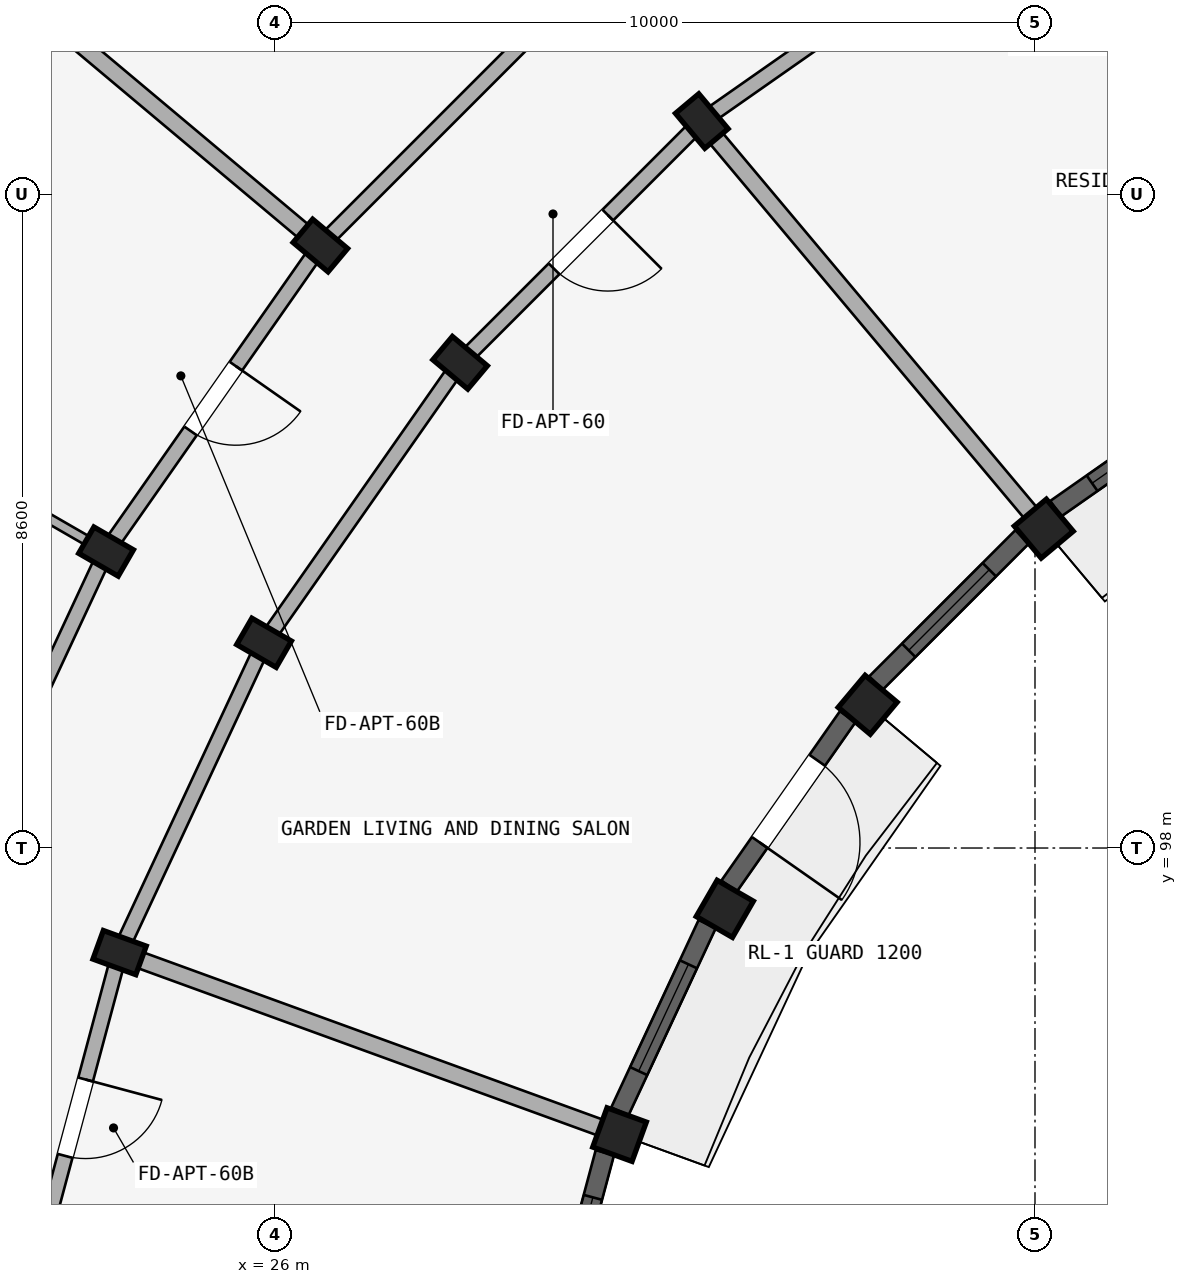
"""IFC4 building model, lengths in metres.
Left out: names, types, materials, properties, quantities, classifications, styles, units other than length and angle.
Written with IfcOpenShell. Run it as: python <this file> out.ifc"""

import sys

from ifc_helpers import new_model, si_unit, direction, frame, frame_2d, origin, origin_2d, place, context, subcontext, project, spatial, rectangle, extrude, element, fill, save


model = new_model("IFC4")
c1 = context("Model", 3, precision=1e-05, world=origin(), true_north=direction((0.0, 1.0)))
c2 = subcontext(c1, "Body", "Model", "MODEL_VIEW")
j1 = project(units=[si_unit("LENGTHUNIT", "METRE"), si_unit("PLANEANGLEUNIT", "RADIAN")], contexts=[c1])
p1 = place(None, origin())
s1 = spatial("IfcSite", under=j1, at=p1, CompositionType="ELEMENT")
p2 = place(p1, origin())
s2 = spatial("IfcBuilding", under=s1, at=p2, CompositionType="ELEMENT")
p3 = place(p2, frame((0.0, 0.0, 40.2)))
s3 = spatial("IfcBuildingStorey", under=s2, at=p3, CompositionType="ELEMENT", Elevation=40.2)
p4 = place(p3, frame((36.115, 102.202, 0.0), z_axis=(0.0, 0.0, 1.0), x_axis=(0.766044443119, 0.642787609687, 0.0)))
e1 = element("IfcColumn", 1, at=p4, inside=s3, PredefinedType="COLUMN", context=c2, shape_type="SweptSolid", body=[
    extrude(rectangle(XDim=0.55, YDim=0.55, at=origin_2d()), origin(), (0.0, 0.0, 1.0), 2.93),
])
p5 = place(p3, frame((31.616, 107.564, 0.0), z_axis=(0.0, 0.0, 1.0), x_axis=(0.766044443119, 0.642787609687, 0.0)))
e2 = element("IfcColumn", 2, at=p5, inside=s3, PredefinedType="COLUMN", context=c2, shape_type="SweptSolid", body=[
    extrude(rectangle(XDim=0.4, YDim=0.6, at=origin_2d()), origin(), (0.0, 0.0, 1.0), 2.93),
])
p6 = place(p3, frame((33.798, 99.885, 0.0), z_axis=(0.0, 0.0, 1.0), x_axis=(0.642787609687, 0.766044443119, 0.0)))
e3 = element("IfcColumn", 3, at=p6, inside=s3, PredefinedType="COLUMN", context=c2, shape_type="SweptSolid", body=[
    extrude(rectangle(XDim=0.55, YDim=0.55, at=origin_2d()), origin(), (0.0, 0.0, 1.0), 2.93),
])
for number, where, z_axis, x_axis in (
    (4, (28.436, 104.384, 0.0), (0.0, 0.0, 1.0), (0.643, 0.766, 0.0)),
    (5, (26.598, 105.927, 0.0), (0.0, 0.0, 1.0), (0.643, 0.766, 0.0)),
):
    element("IfcColumn", number, at=place(p3, frame(where, z_axis=z_axis, x_axis=x_axis)), inside=s3, PredefinedType="COLUMN", context=c2, shape_type="SweptSolid", body=[
        extrude(rectangle(XDim=0.4, YDim=0.6, at=origin_2d()), origin(), (0.0, 0.0, 1.0), 2.93),
    ])
p7 = place(p3, frame((31.919, 97.2, 0.0), z_axis=(0.0, 0.0, 1.0), x_axis=(0.5, 0.866025403784, 0.0)))
e6 = element("IfcColumn", 6, at=p7, inside=s3, PredefinedType="COLUMN", context=c2, shape_type="SweptSolid", body=[
    extrude(rectangle(XDim=0.55, YDim=0.55, at=origin_2d()), origin(), (0.0, 0.0, 1.0), 2.93),
])
for number, where, z_axis, x_axis in (
    (7, (25.856, 100.7, 0.0), (0.0, 0.0, 1.0), (0.5, 0.866, 0.0)),
    (8, (23.778, 101.9, 0.0), (0.0, 0.0, 1.0), (0.5, 0.866, 0.0)),
):
    element("IfcColumn", number, at=place(p3, frame(where, z_axis=z_axis, x_axis=x_axis)), inside=s3, PredefinedType="COLUMN", context=c2, shape_type="SweptSolid", body=[
        extrude(rectangle(XDim=0.4, YDim=0.6, at=origin_2d()), origin(), (0.0, 0.0, 1.0), 2.93),
    ])
p8 = place(p3, frame((30.534, 94.23, 0.0), z_axis=(0.0, 0.0, 1.0), x_axis=(0.342020143326, 0.939692620786, 0.0)))
e9 = element("IfcColumn", 9, at=p8, inside=s3, PredefinedType="COLUMN", context=c2, shape_type="SweptSolid", body=[
    extrude(rectangle(XDim=0.55, YDim=0.55, at=origin_2d()), origin(), (0.0, 0.0, 1.0), 2.93),
])
p9 = place(p3, frame((23.956, 96.624, 0.0), z_axis=(0.0, 0.0, 1.0), x_axis=(0.342020143326, 0.939692620786, 0.0)))
e10 = element("IfcColumn", 10, at=p9, inside=s3, PredefinedType="COLUMN", context=c2, shape_type="SweptSolid", body=[
    extrude(rectangle(XDim=0.4, YDim=0.6, at=origin_2d()), origin(), (0.0, 0.0, 1.0), 2.93),
])
p10 = place(p3, frame((35.3, 110.144, 0.0), z_axis=(0.0, 0.0, 1.0), x_axis=(-0.819155404658, -0.573571637217, 0.0)))
e11 = element("IfcWall", 11, at=p10, inside=s3, PredefinedType="STANDARD", context=c2, shape_type="SweptSolid", body=[
    extrude(rectangle(XDim=4.497, YDim=0.2, at=frame_2d((2.249, 0.0))), origin(), (0.0, 0.0, 1.0), 2.372),
])
p11 = place(p3, frame((31.616, 107.564, 0.0), z_axis=(0.0, 0.0, 1.0), x_axis=(-0.707106781187, -0.707106781187, 0.0)))
e12 = element("IfcWall", 12, at=p11, inside=s3, PredefinedType="STANDARD", context=c2, shape_type="SweptSolid", body=[
    extrude(rectangle(XDim=4.497, YDim=0.2, at=frame_2d((2.249, 0.0))), origin(), (0.0, 0.0, 1.0), 2.372),
])
p12 = place(p11, frame((1.749, 0.0, 0.0)))
e13 = element("IfcOpeningElement", 13, at=p12, cuts=e12, PredefinedType="OPENING", context=c2, shape_type="SweptSolid", body=[
    extrude(rectangle(XDim=1.0, YDim=2.15, at=frame_2d((0.5, 1.075))), frame((0.0, 0.11, 0.0), z_axis=(0.0, -1.0, 0.0), x_axis=(1.0, 0.0, 0.0)), (0.0, 0.0, 1.0), 0.22),
])
p13 = place(p3, frame((30.073, 109.402, 0.0), z_axis=(0.0, 0.0, 1.0), x_axis=(-0.707106781187, -0.707106781187, 0.0)))
e14 = element("IfcWall", 14, at=p13, inside=s3, PredefinedType="STANDARD", context=c2, shape_type="SweptSolid", body=[
    extrude(rectangle(XDim=4.916, YDim=0.2, at=frame_2d((2.458, 0.0))), origin(), (0.0, 0.0, 1.0), 2.372),
])
p14 = place(p3, frame((28.436, 104.384, 0.0), z_axis=(0.0, 0.0, 1.0), x_axis=(-0.573571637217, -0.819155404658, 0.0)))
e15 = element("IfcWall", 15, at=p14, inside=s3, PredefinedType="STANDARD", context=c2, shape_type="SweptSolid", body=[
    extrude(rectangle(XDim=4.497, YDim=0.2, at=frame_2d((2.249, 0.0))), origin(), (0.0, 0.0, 1.0), 2.372),
])
p15 = place(p3, frame((26.598, 105.927, 0.0), z_axis=(0.0, 0.0, 1.0), x_axis=(-0.573592335331, -0.819140911474, 0.0)))
e16 = element("IfcWall", 16, at=p15, inside=s3, PredefinedType="STANDARD", context=c2, shape_type="SweptSolid", body=[
    extrude(rectangle(XDim=4.916, YDim=0.2, at=frame_2d((2.458, 0.0))), origin(), (0.0, 0.0, 1.0), 2.372),
])
p16 = place(p15, frame((1.938, 0.0, 0.0)))
e17 = element("IfcOpeningElement", 17, at=p16, cuts=e16, PredefinedType="OPENING", context=c2, shape_type="SweptSolid", body=[
    extrude(rectangle(XDim=1.04, YDim=2.15, at=frame_2d((0.52, 1.075))), frame((0.0, 0.11, 0.0), z_axis=(0.0, -1.0, 0.0), x_axis=(1.0, 0.0, 0.0)), (0.0, 0.0, 1.0), 0.22),
])
p17 = place(p3, frame((25.856, 100.7, 0.0), z_axis=(0.0, 0.0, 1.0), x_axis=(-0.422617978463, -0.906307919131, 0.0)))
e18 = element("IfcWall", 18, at=p17, inside=s3, PredefinedType="STANDARD", context=c2, shape_type="SweptSolid", body=[
    extrude(rectangle(XDim=4.497, YDim=0.2, at=frame_2d((2.249, 0.0))), origin(), (0.0, 0.0, 1.0), 2.372),
])
p18 = place(p3, frame((23.778, 101.9, 0.0), z_axis=(0.0, 0.0, 1.0), x_axis=(-0.422629854778, -0.906302381024, 0.0)))
e19 = element("IfcWall", 19, at=p18, inside=s3, PredefinedType="STANDARD", context=c2, shape_type="SweptSolid", body=[
    extrude(rectangle(XDim=4.915, YDim=0.2, at=frame_2d((2.458, 0.0))), origin(), (0.0, 0.0, 1.0), 2.372),
])
p19 = place(p3, frame((23.956, 96.624, 0.0), z_axis=(0.0, 0.0, 1.0), x_axis=(-0.258787642463, -0.965934240054, 0.0)))
e20 = element("IfcWall", 20, at=p19, inside=s3, PredefinedType="STANDARD", context=c2, shape_type="SweptSolid", body=[
    extrude(rectangle(XDim=4.497, YDim=0.2, at=frame_2d((2.249, 0.0))), origin(), (0.0, 0.0, 1.0), 2.372),
])
p20 = place(p19, frame((1.729, 0.0, 0.0)))
e21 = element("IfcOpeningElement", 21, at=p20, cuts=e20, PredefinedType="OPENING", context=c2, shape_type="SweptSolid", body=[
    extrude(rectangle(XDim=1.04, YDim=2.15, at=frame_2d((0.52, 1.075))), frame((0.0, 0.11, 0.0), z_axis=(0.0, -1.0, 0.0), x_axis=(1.0, 0.0, 0.0)), (0.0, 0.0, 1.0), 0.22),
])
p21 = place(p3, frame((35.987, 102.355, 0.0), z_axis=(0.0, 0.0, 1.0), x_axis=(-0.642784846501, 0.766046761698, 0.0)))
e22 = element("IfcWall", 22, at=p21, inside=s3, PredefinedType="STANDARD", context=c2, shape_type="SweptSolid", body=[
    extrude(rectangle(XDim=6.75, YDim=0.22, at=frame_2d((3.375, 0.0))), origin(), (0.0, 0.0, 1.0), 2.372),
])
p22 = place(p3, frame((26.521, 105.991, 0.0), z_axis=(0.0, 0.0, 1.0), x_axis=(-0.76605148563, 0.642779216656, 0.0)))
e23 = element("IfcWall", 23, at=p22, inside=s3, PredefinedType="STANDARD", context=c2, shape_type="SweptSolid", body=[
    extrude(rectangle(XDim=14.62, YDim=0.22, at=frame_2d((7.31, 0.0))), origin(), (0.0, 0.0, 1.0), 2.372),
])
p23 = place(p3, frame((23.691, 101.95, 0.0), z_axis=(0.0, 0.0, 1.0), x_axis=(-0.866020956416, 0.500007702989, 0.0)))
e24 = element("IfcWall", 24, at=p23, inside=s3, PredefinedType="PARTITIONING", context=c2, shape_type="SweptSolid", body=[
    extrude(rectangle(XDim=14.62, YDim=0.125, at=frame_2d((7.31, 0.0))), origin(), (0.0, 0.0, 1.0), 2.372),
])
p24 = place(p23, frame((4.449, 0.0, 0.0)))
e25 = element("IfcOpeningElement", 25, at=p24, cuts=e24, PredefinedType="OPENING", context=c2, shape_type="SweptSolid", body=[
    extrude(rectangle(XDim=0.8, YDim=2.1, at=frame_2d((0.4, 1.05))), frame((0.0, 0.073, 0.0), z_axis=(0.0, -1.0, 0.0), x_axis=(1.0, 0.0, 0.0)), (0.0, 0.0, 1.0), 0.145),
])
p25 = place(p3, frame((30.346, 94.298, 0.0), z_axis=(0.0, 0.0, 1.0), x_axis=(-0.939696231917, 0.342010221662, 0.0)))
e26 = element("IfcWall", 26, at=p25, inside=s3, PredefinedType="STANDARD", context=c2, shape_type="SweptSolid", body=[
    extrude(rectangle(XDim=6.75, YDim=0.22, at=frame_2d((3.375, 0.0))), origin(), (0.0, 0.0, 1.0), 2.372),
])
p26 = place(p3, frame((38.5, 104.024, 0.0), z_axis=(0.0, 0.0, 1.0), x_axis=(-0.819126475299, -0.573612950921, 0.0)))
e27 = element("IfcWall", 27, at=p26, inside=s3, PredefinedType="STANDARD", context=c2, shape_type="SweptSolid", body=[
    extrude(rectangle(XDim=2.72, YDim=0.25, at=frame_2d((1.36, 0.0))), origin(), (0.0, 0.0, 1.0), 2.472),
])
p27 = place(p26, frame((0.585, 0.0, 0.672)))
e28 = element("IfcOpeningElement", 28, at=p27, cuts=e27, PredefinedType="OPENING", context=c2, shape_type="SweptSolid", body=[
    extrude(rectangle(XDim=1.55, YDim=1.6, at=frame_2d((0.775, 0.8))), frame((0.0, 0.135, 0.0), z_axis=(0.0, -1.0, 0.0), x_axis=(1.0, 0.0, 0.0)), (0.0, 0.0, 1.0), 0.27),
])
p28 = place(p3, frame((35.83, 102.093, 0.0), z_axis=(0.0, 0.0, 1.0), x_axis=(-0.707106781187, -0.707106781187, 0.0)))
e29 = element("IfcWall", 29, at=p28, inside=s3, PredefinedType="STANDARD", context=c2, shape_type="SweptSolid", body=[
    extrude(rectangle(XDim=2.72, YDim=0.25, at=frame_2d((1.36, 0.0))), origin(), (0.0, 0.0, 1.0), 2.472),
])
p29 = place(p28, frame((0.61, 0.0, 0.622)))
e30 = element("IfcOpeningElement", 30, at=p29, cuts=e29, PredefinedType="OPENING", context=c2, shape_type="SweptSolid", body=[
    extrude(rectangle(XDim=1.5, YDim=1.65, at=frame_2d((0.75, 0.825))), frame((0.0, 0.135, 0.0), z_axis=(0.0, -1.0, 0.0), x_axis=(1.0, 0.0, 0.0)), (0.0, 0.0, 1.0), 0.27),
])
p30 = place(p3, frame((33.536, 99.728, 0.0), z_axis=(0.0, 0.0, 1.0), x_axis=(-0.573612950921, -0.819126475299, 0.0)))
e31 = element("IfcWall", 31, at=p30, inside=s3, PredefinedType="STANDARD", context=c2, shape_type="SweptSolid", body=[
    extrude(rectangle(XDim=2.72, YDim=0.25, at=frame_2d((1.36, 0.0))), origin(), (0.0, 0.0, 1.0), 2.472),
])
p31 = place(p30, frame((0.7, 0.0, 0.0)))
e32 = element("IfcOpeningElement", 32, at=p31, cuts=e31, PredefinedType="OPENING", context=c2, shape_type="SweptSolid", body=[
    extrude(rectangle(XDim=1.32, YDim=2.15, at=frame_2d((0.66, 1.075))), frame((0.0, 0.135, 0.0), z_axis=(0.0, -1.0, 0.0), x_axis=(1.0, 0.0, 0.0)), (0.0, 0.0, 1.0), 0.27),
])
p32 = place(p3, frame((31.688, 97.0, 0.0), z_axis=(0.0, 0.0, 1.0), x_axis=(-0.422629903269, -0.906302358412, 0.0)))
e33 = element("IfcWall", 33, at=p32, inside=s3, PredefinedType="STANDARD", context=c2, shape_type="SweptSolid", body=[
    extrude(rectangle(XDim=2.72, YDim=0.25, at=frame_2d((1.36, 0.0))), origin(), (0.0, 0.0, 1.0), 2.472),
])
p33 = place(p32, frame((0.585, 0.0, 0.672)))
e34 = element("IfcOpeningElement", 34, at=p33, cuts=e33, PredefinedType="OPENING", context=c2, shape_type="SweptSolid", body=[
    extrude(rectangle(XDim=1.55, YDim=1.6, at=frame_2d((0.775, 0.8))), frame((0.0, 0.135, 0.0), z_axis=(0.0, -1.0, 0.0), x_axis=(1.0, 0.0, 0.0)), (0.0, 0.0, 1.0), 0.27),
])
p34 = place(p3, frame((30.341, 93.993, 0.0), z_axis=(0.0, 0.0, 1.0), x_axis=(-0.258807879411, -0.965928818058, 0.0)))
e35 = element("IfcWall", 35, at=p34, inside=s3, PredefinedType="STANDARD", context=c2, shape_type="SweptSolid", body=[
    extrude(rectangle(XDim=2.72, YDim=0.25, at=frame_2d((1.36, 0.0))), origin(), (0.0, 0.0, 1.0), 2.472),
])
p35 = place(p34, frame((0.61, 0.0, 0.622)))
e36 = element("IfcOpeningElement", 36, at=p35, cuts=e35, PredefinedType="OPENING", context=c2, shape_type="SweptSolid", body=[
    extrude(rectangle(XDim=1.5, YDim=1.65, at=frame_2d((0.75, 0.825))), frame((0.0, 0.135, 0.0), z_axis=(0.0, -1.0, 0.0), x_axis=(1.0, 0.0, 0.0)), (0.0, 0.0, 1.0), 0.27),
])
p36 = place(p27, origin())
e37 = element("IfcWindow", 37, at=p36, inside=s3, PartitioningType="DOUBLE_PANEL_VERTICAL", PredefinedType="WINDOW", context=c2, shape_type="SweptSolid", body=[
    extrude(rectangle(XDim=1.55, YDim=1.6, at=frame_2d((0.775, 0.8))), frame((0.0, 0.03, 0.0), z_axis=(0.0, -1.0, 0.0), x_axis=(1.0, 0.0, 0.0)), (0.0, 0.0, 1.0), 0.06),
])
fill(e28, e37)
p37 = place(p29, origin())
e38 = element("IfcWindow", 38, at=p37, inside=s3, PartitioningType="DOUBLE_PANEL_VERTICAL", PredefinedType="WINDOW", context=c2, shape_type="SweptSolid", body=[
    extrude(rectangle(XDim=1.5, YDim=1.65, at=frame_2d((0.75, 0.825))), frame((0.0, 0.03, 0.0), z_axis=(0.0, -1.0, 0.0), x_axis=(1.0, 0.0, 0.0)), (0.0, 0.0, 1.0), 0.06),
])
fill(e30, e38)
p38 = place(p33, origin())
e39 = element("IfcWindow", 39, at=p38, inside=s3, PartitioningType="DOUBLE_PANEL_VERTICAL", PredefinedType="WINDOW", context=c2, shape_type="SweptSolid", body=[
    extrude(rectangle(XDim=1.55, YDim=1.6, at=frame_2d((0.775, 0.8))), frame((0.0, 0.03, 0.0), z_axis=(0.0, -1.0, 0.0), x_axis=(1.0, 0.0, 0.0)), (0.0, 0.0, 1.0), 0.06),
])
fill(e34, e39)
p39 = place(p35, origin())
e40 = element("IfcWindow", 40, at=p39, inside=s3, PartitioningType="DOUBLE_PANEL_VERTICAL", PredefinedType="WINDOW", context=c2, shape_type="SweptSolid", body=[
    extrude(rectangle(XDim=1.5, YDim=1.65, at=frame_2d((0.75, 0.825))), frame((0.0, 0.03, 0.0), z_axis=(0.0, -1.0, 0.0), x_axis=(1.0, 0.0, 0.0)), (0.0, 0.0, 1.0), 0.06),
])
fill(e36, e40)
p40 = place(p16, origin())
e41 = element("IfcDoor", 41, at=p40, inside=s3, OperationType="SINGLE_SWING_LEFT", PredefinedType="DOOR", context=c2, shape_type="SweptSolid", body=[
    extrude(rectangle(XDim=1.04, YDim=2.15, at=frame_2d((0.52, 1.075))), frame((0.0, 0.025, 0.0), z_axis=(0.0, -1.0, 0.0), x_axis=(1.0, 0.0, 0.0)), (0.0, 0.0, 1.0), 0.05),
])
fill(e17, e41)
p41 = place(p12, origin())
e42 = element("IfcDoor", 42, at=p41, inside=s3, OperationType="SINGLE_SWING_LEFT", PredefinedType="DOOR", context=c2, shape_type="SweptSolid", body=[
    extrude(rectangle(XDim=1.0, YDim=2.15, at=frame_2d((0.5, 1.075))), frame((0.0, 0.025, 0.0), z_axis=(0.0, -1.0, 0.0), x_axis=(1.0, 0.0, 0.0)), (0.0, 0.0, 1.0), 0.05),
])
fill(e13, e42)
p42 = place(p20, frame((1.04, 0.0, 0.0), z_axis=(0.0, 0.0, 1.0), x_axis=(-1.0, 0.0, 0.0)))
e43 = element("IfcDoor", 43, at=p42, inside=s3, OperationType="SINGLE_SWING_RIGHT", PredefinedType="DOOR", context=c2, shape_type="SweptSolid", body=[
    extrude(rectangle(XDim=1.04, YDim=2.15, at=frame_2d((0.52, 1.075))), frame((0.0, 0.025, 0.0), z_axis=(0.0, -1.0, 0.0), x_axis=(1.0, 0.0, 0.0)), (0.0, 0.0, 1.0), 0.05),
])
fill(e21, e43)
p43 = place(p31, origin())
e44 = element("IfcDoor", 44, at=p43, inside=s3, OperationType="SINGLE_SWING_RIGHT", PredefinedType="DOOR", context=c2, shape_type="SweptSolid", body=[
    extrude(rectangle(XDim=1.32, YDim=2.15, at=frame_2d((0.66, 1.075))), frame((0.0, 0.025, 0.0), z_axis=(0.0, -1.0, 0.0), x_axis=(1.0, 0.0, 0.0)), (0.0, 0.0, 1.0), 0.05),
])
fill(e32, e44)
save(model, sys.argv[1])
